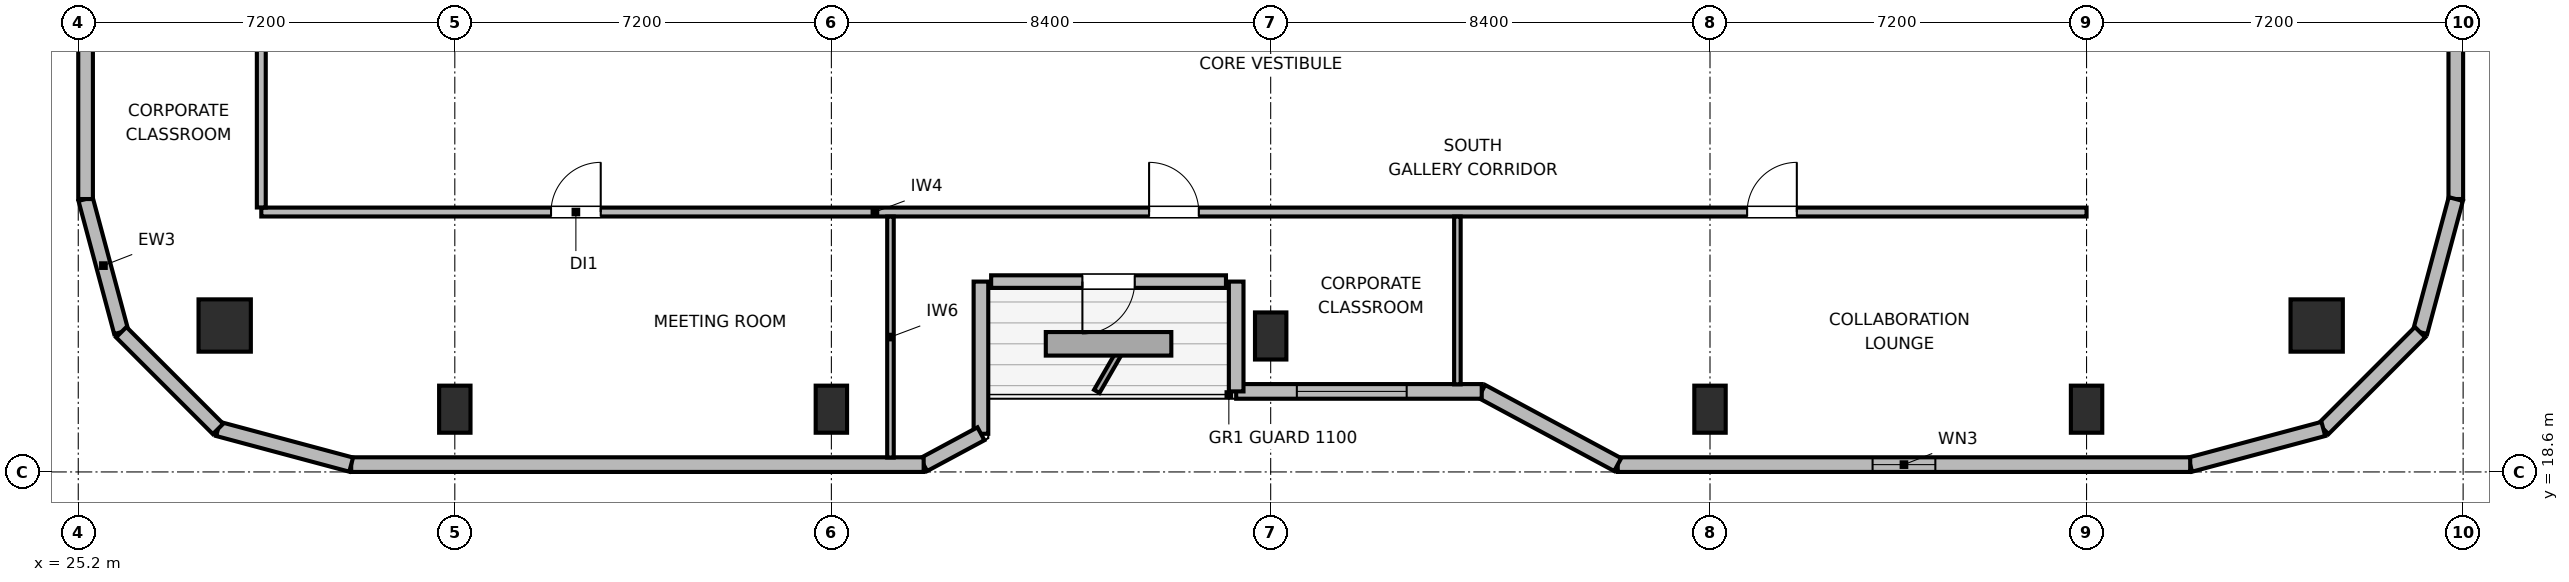
"""IFC4 building model, lengths in metres.
Left out: names, types, materials, properties, quantities, classifications, styles, units other than length and angle.
Written with IfcOpenShell. Run it as: python <this file> out.ifc"""

import sys

from ifc_helpers import new_model, si_unit, direction, frame, frame_2d, origin, origin_2d, place, context, subcontext, project, spatial, rectangle, circle, extrude, element, fill, save


model = new_model("IFC4")
c1 = context("Model", 3, precision=1e-05, world=origin(), true_north=direction((0.0, 1.0)))
c2 = subcontext(c1, "Body", "Model", "MODEL_VIEW")
j1 = project(units=[si_unit("LENGTHUNIT", "METRE"), si_unit("PLANEANGLEUNIT", "RADIAN")], contexts=[c1])
p1 = place(None, origin())
s1 = spatial("IfcSite", under=j1, at=p1, CompositionType="ELEMENT")
p2 = place(p1, origin())
s2 = spatial("IfcBuilding", under=s1, at=p2, CompositionType="ELEMENT")
p3 = place(p2, frame((0.0, 0.0, 219.3)))
s3 = spatial("IfcBuildingStorey", under=s2, at=p3, CompositionType="ELEMENT", Elevation=219.3)
for number, where, z_axis, x_axis in (
    (1, (28.0, 21.4, 0.0), (0.0, 0.0, 1.0), (1.0, 0.0, 0.0)),
    (2, (68.0, 21.4, 0.0), (0.0, 0.0, 1.0), (1.0, 0.0, 0.0)),
):
    element("IfcColumn", number, at=place(p3, frame(where, z_axis=z_axis, x_axis=x_axis)), inside=s3, PredefinedType="COLUMN", context=c2, shape_type="SweptSolid", body=[
        extrude(circle(Radius=0.5, at=origin_2d()), origin(), (0.0, 0.0, 1.0), 3.9),
    ])
for number, where, z_axis, x_axis in (
    (3, (32.4, 19.8, 0.0), (0.0, 0.0, 1.0), (1.0, 0.0, 0.0)),
    (4, (39.6, 19.8, 0.0), (0.0, 0.0, 1.0), (1.0, 0.0, 0.0)),
    (5, (48.0, 21.2, 0.0), (0.0, 0.0, 1.0), (1.0, 0.0, 0.0)),
    (6, (56.4, 19.8, 0.0), (0.0, 0.0, 1.0), (1.0, 0.0, 0.0)),
    (7, (63.6, 19.8, 0.0), (0.0, 0.0, 1.0), (1.0, 0.0, 0.0)),
):
    element("IfcColumn", number, at=place(p3, frame(where, z_axis=z_axis, x_axis=x_axis)), inside=s3, PredefinedType="COLUMN", context=c2, shape_type="SweptSolid", body=[
        extrude(rectangle(XDim=0.6, YDim=0.9, at=origin_2d()), origin(), (0.0, 0.0, 1.0), 3.9),
    ])
p4 = place(p3, frame((26.022, 21.272, 0.0), z_axis=(0.0, 0.0, 1.0), x_axis=(-0.2588904131, 0.965906700466, 0.0)))
e8 = element("IfcWall", 8, at=p4, inside=s3, PredefinedType="SOLIDWALL", context=c2, shape_type="SweptSolid", body=[
    extrude(rectangle(XDim=2.636, YDim=0.28, at=frame_2d((1.318, 0.0))), origin(), (0.0, 0.0, 1.0), 3.68),
])
p5 = place(p3, frame((25.34, 23.818, 0.0), z_axis=(0.0, 0.0, 1.0), x_axis=(0.0, 1.0, 0.0)))
e9 = element("IfcWall", 9, at=p5, inside=s3, PredefinedType="SOLIDWALL", context=c2, shape_type="SweptSolid", body=[
    extrude(rectangle(XDim=5.442, YDim=0.28, at=frame_2d((2.721, 0.0))), origin(), (0.0, 0.0, 1.0), 3.68),
])
p6 = place(p3, frame((70.66, 37.66, 0.0), z_axis=(0.0, 0.0, 1.0), x_axis=(0.0, -1.0, 0.0)))
e10 = element("IfcWall", 10, at=p6, inside=s3, PredefinedType="SOLIDWALL", context=c2, shape_type="SweptSolid", body=[
    extrude(rectangle(XDim=13.842, YDim=0.28, at=frame_2d((6.921, 0.0))), origin(), (0.0, 0.0, 1.0), 3.68),
])
p7 = place(p6, frame((8.346, 0.0, 0.85)))
e11 = element("IfcOpeningElement", 11, at=p7, cuts=e10, PredefinedType="OPENING", context=c2, shape_type="SweptSolid", body=[
    extrude(rectangle(XDim=2.1, YDim=1.05, at=frame_2d((1.05, 0.525))), frame((0.0, 0.15, 0.0), z_axis=(0.0, -1.0, 0.0), x_axis=(1.0, 0.0, 0.0)), (0.0, 0.0, 1.0), 0.3),
])
p8 = place(p3, frame((70.66, 23.818, 0.0), z_axis=(0.0, 0.0, 1.0), x_axis=(-0.2588904131, -0.965906700466, 0.0)))
e12 = element("IfcWall", 12, at=p8, inside=s3, PredefinedType="SOLIDWALL", context=c2, shape_type="SweptSolid", body=[
    extrude(rectangle(XDim=2.636, YDim=0.28, at=frame_2d((1.318, 0.0))), origin(), (0.0, 0.0, 1.0), 3.68),
])
p9 = place(p3, frame((69.978, 21.272, 0.0), z_axis=(0.0, 0.0, 1.0), x_axis=(-0.707153437963, -0.707060121331, 0.0)))
e13 = element("IfcWall", 13, at=p9, inside=s3, PredefinedType="SOLIDWALL", context=c2, shape_type="SweptSolid", body=[
    extrude(rectangle(XDim=2.616, YDim=0.28, at=frame_2d((1.308, 0.0))), origin(), (0.0, 0.0, 1.0), 3.68),
])
p10 = place(p3, frame((68.127, 19.423, 0.0), z_axis=(0.0, 0.0, 1.0), x_axis=(-0.965883534663, -0.258976828051, 0.0)))
e14 = element("IfcWall", 14, at=p10, inside=s3, PredefinedType="SOLIDWALL", context=c2, shape_type="SweptSolid", body=[
    extrude(rectangle(XDim=2.636, YDim=0.28, at=frame_2d((1.318, 0.0))), origin(), (0.0, 0.0, 1.0), 3.68),
])
p11 = place(p3, frame((65.582, 18.74, 0.0), z_axis=(0.0, 0.0, 1.0), x_axis=(-1.0, 0.0, 0.0)))
e15 = element("IfcWall", 15, at=p11, inside=s3, PredefinedType="SOLIDWALL", context=c2, shape_type="SweptSolid", body=[
    extrude(rectangle(XDim=10.946, YDim=0.28, at=frame_2d((5.473, 0.0))), origin(), (0.0, 0.0, 1.0), 3.68),
])
p12 = place(p11, frame((4.873, 0.0, 0.85)))
e16 = element("IfcOpeningElement", 16, at=p12, cuts=e15, PredefinedType="OPENING", context=c2, shape_type="SweptSolid", body=[
    extrude(rectangle(XDim=1.2, YDim=1.1, at=frame_2d((0.6, 0.55))), frame((0.0, 0.15, 0.0), z_axis=(0.0, -1.0, 0.0), x_axis=(1.0, 0.0, 0.0)), (0.0, 0.0, 1.0), 0.3),
])
p13 = place(p3, frame((54.635, 18.74, 0.0), z_axis=(0.0, 0.0, 1.0), x_axis=(-0.880473754814, 0.474094892488, 0.0)))
e17 = element("IfcWall", 17, at=p13, inside=s3, PredefinedType="SOLIDWALL", context=c2, shape_type="SweptSolid", body=[
    extrude(rectangle(XDim=2.953, YDim=0.28, at=frame_2d((1.477, 0.0))), origin(), (0.0, 0.0, 1.0), 2.265),
])
p14 = place(p3, frame((52.035, 20.14, 0.0), z_axis=(0.0, 0.0, 1.0), x_axis=(-1.0, 0.0, 0.0)))
e18 = element("IfcWall", 18, at=p14, inside=s3, PredefinedType="SOLIDWALL", context=c2, shape_type="SweptSolid", body=[
    extrude(rectangle(XDim=4.695, YDim=0.28, at=frame_2d((2.348, 0.0))), origin(), (0.0, 0.0, 1.0), 2.265),
])
p15 = place(p14, frame((1.435, 0.0, 0.85)))
e19 = element("IfcOpeningElement", 19, at=p15, cuts=e18, PredefinedType="OPENING", context=c2, shape_type="SweptSolid", body=[
    extrude(rectangle(XDim=2.1, YDim=1.05, at=frame_2d((1.05, 0.525))), frame((0.0, 0.15, 0.0), z_axis=(0.0, -1.0, 0.0), x_axis=(1.0, 0.0, 0.0)), (0.0, 0.0, 1.0), 0.3),
])
p16 = place(p3, frame((47.34, 20.14, 0.0), z_axis=(0.0, 0.0, 1.0), x_axis=(0.0, 1.0, 0.0)))
e20 = element("IfcWall", 20, at=p16, inside=s3, PredefinedType="SOLIDWALL", context=c2, shape_type="SweptSolid", body=[
    extrude(rectangle(XDim=2.1, YDim=0.28, at=frame_2d((1.05, 0.0))), origin(), (0.0, 0.0, 1.0), 2.265),
])
p17 = place(p3, frame((47.145, 22.24, 0.0), z_axis=(0.0, 0.0, 1.0), x_axis=(-1.0, 0.0, 0.0)))
e21 = element("IfcWall", 21, at=p17, inside=s3, PredefinedType="SOLIDWALL", context=c2, shape_type="SweptSolid", body=[
    extrude(rectangle(XDim=4.49, YDim=0.24, at=frame_2d((2.245, 0.0))), origin(), (0.0, 0.0, 1.0), 3.68),
])
p18 = place(p17, frame((1.745, 0.0, 0.0)))
e22 = element("IfcOpeningElement", 22, at=p18, cuts=e21, PredefinedType="OPENING", context=c2, shape_type="SweptSolid", body=[
    extrude(rectangle(XDim=1.0, YDim=2.02, at=frame_2d((0.5, 1.01))), frame((0.0, 0.13, 0.0), z_axis=(0.0, -1.0, 0.0), x_axis=(1.0, 0.0, 0.0)), (0.0, 0.0, 1.0), 0.26),
])
p19 = place(p3, frame((42.46, 22.24, 0.0), z_axis=(0.0, 0.0, 1.0), x_axis=(0.0, -1.0, 0.0)))
e23 = element("IfcWall", 23, at=p19, inside=s3, PredefinedType="SOLIDWALL", context=c2, shape_type="SweptSolid", body=[
    extrude(rectangle(XDim=2.91, YDim=0.28, at=frame_2d((1.455, 0.0))), origin(), (0.0, 0.0, 1.0), 2.265),
])
p20 = place(p3, frame((42.46, 19.33, 0.0), z_axis=(0.0, 0.0, 1.0), x_axis=(-0.880515214249, -0.474017887296, 0.0)))
e24 = element("IfcWall", 24, at=p20, inside=s3, PredefinedType="SOLIDWALL", context=c2, shape_type="SweptSolid", body=[
    extrude(rectangle(XDim=1.244, YDim=0.28, at=frame_2d((0.622, 0.0))), origin(), (0.0, 0.0, 1.0), 3.68),
])
p21 = place(p3, frame((41.365, 18.74, 0.0), z_axis=(0.0, 0.0, 1.0), x_axis=(-1.0, 0.0, 0.0)))
e25 = element("IfcWall", 25, at=p21, inside=s3, PredefinedType="SOLIDWALL", context=c2, shape_type="SweptSolid", body=[
    extrude(rectangle(XDim=10.946, YDim=0.28, at=frame_2d((5.473, 0.0))), origin(), (0.0, 0.0, 1.0), 3.68),
])
p22 = place(p3, frame((30.418, 18.74, 0.0), z_axis=(0.0, 0.0, 1.0), x_axis=(-0.965883534663, 0.258976828051, 0.0)))
e26 = element("IfcWall", 26, at=p22, inside=s3, PredefinedType="SOLIDWALL", context=c2, shape_type="SweptSolid", body=[
    extrude(rectangle(XDim=2.636, YDim=0.28, at=frame_2d((1.318, 0.0))), origin(), (0.0, 0.0, 1.0), 3.68),
])
p23 = place(p3, frame((27.873, 19.423, 0.0), z_axis=(0.0, 0.0, 1.0), x_axis=(-0.707153437963, 0.707060121331, 0.0)))
e27 = element("IfcWall", 27, at=p23, inside=s3, PredefinedType="SOLIDWALL", context=c2, shape_type="SweptSolid", body=[
    extrude(rectangle(XDim=2.616, YDim=0.28, at=frame_2d((1.308, 0.0))), origin(), (0.0, 0.0, 1.0), 3.68),
])
p24 = place(p3, frame((28.7, 23.57, 0.0), z_axis=(0.0, 0.0, 1.0), x_axis=(1.0, 0.0, 0.0)))
e28 = element("IfcWall", 28, at=p24, inside=s3, PredefinedType="PARTITIONING", context=c2, shape_type="SweptSolid", body=[
    extrude(rectangle(XDim=34.9, YDim=0.17, at=frame_2d((17.45, 0.0))), origin(), (0.0, 0.0, 1.0), 3.68),
])
p25 = place(p24, frame((5.54, 0.0, 0.0)))
e29 = element("IfcOpeningElement", 29, at=p25, cuts=e28, PredefinedType="OPENING", context=c2, shape_type="SweptSolid", body=[
    extrude(rectangle(XDim=0.95, YDim=2.04, at=frame_2d((0.475, 1.02))), frame((0.0, 0.095, 0.0), z_axis=(0.0, -1.0, 0.0), x_axis=(1.0, 0.0, 0.0)), (0.0, 0.0, 1.0), 0.19),
])
p26 = place(p24, frame((16.975, 0.0, 0.0)))
e30 = element("IfcOpeningElement", 30, at=p26, cuts=e28, PredefinedType="OPENING", context=c2, shape_type="SweptSolid", body=[
    extrude(rectangle(XDim=0.95, YDim=2.04, at=frame_2d((0.475, 1.02))), frame((0.0, 0.095, 0.0), z_axis=(0.0, -1.0, 0.0), x_axis=(1.0, 0.0, 0.0)), (0.0, 0.0, 1.0), 0.19),
])
p27 = place(p24, frame((28.41, 0.0, 0.0)))
e31 = element("IfcOpeningElement", 31, at=p27, cuts=e28, PredefinedType="OPENING", context=c2, shape_type="SweptSolid", body=[
    extrude(rectangle(XDim=0.95, YDim=2.04, at=frame_2d((0.475, 1.02))), frame((0.0, 0.095, 0.0), z_axis=(0.0, -1.0, 0.0), x_axis=(1.0, 0.0, 0.0)), (0.0, 0.0, 1.0), 0.19),
])
p28 = place(p3, frame((28.7, 23.657, 0.0), z_axis=(0.0, 0.0, 1.0), x_axis=(0.0, 1.0, 0.0)))
e32 = element("IfcWall", 32, at=p28, inside=s3, PredefinedType="PARTITIONING", context=c2, shape_type="SweptSolid", body=[
    extrude(rectangle(XDim=24.686, YDim=0.17, at=frame_2d((12.343, 0.0))), origin(), (0.0, 0.0, 1.0), 3.68),
])
p29 = place(p28, frame((4.353, 0.0, 0.0)))
e33 = element("IfcOpeningElement", 33, at=p29, cuts=e32, PredefinedType="OPENING", context=c2, shape_type="SweptSolid", body=[
    extrude(rectangle(XDim=0.95, YDim=2.04, at=frame_2d((0.475, 1.02))), frame((0.0, 0.095, 0.0), z_axis=(0.0, -1.0, 0.0), x_axis=(1.0, 0.0, 0.0)), (0.0, 0.0, 1.0), 0.19),
])
p30 = place(p28, frame((12.468, 0.0, 0.0)))
e34 = element("IfcOpeningElement", 34, at=p30, cuts=e32, PredefinedType="OPENING", context=c2, shape_type="SweptSolid", body=[
    extrude(rectangle(XDim=0.95, YDim=2.04, at=frame_2d((0.475, 1.02))), frame((0.0, 0.095, 0.0), z_axis=(0.0, -1.0, 0.0), x_axis=(1.0, 0.0, 0.0)), (0.0, 0.0, 1.0), 0.19),
])
p31 = place(p28, frame((19.983, 0.0, 0.0)))
e35 = element("IfcOpeningElement", 35, at=p31, cuts=e32, PredefinedType="OPENING", context=c2, shape_type="SweptSolid", body=[
    extrude(rectangle(XDim=0.95, YDim=2.04, at=frame_2d((0.475, 1.02))), frame((0.0, 0.095, 0.0), z_axis=(0.0, -1.0, 0.0), x_axis=(1.0, 0.0, 0.0)), (0.0, 0.0, 1.0), 0.19),
])
p32 = place(p3, frame((40.73, 18.875, 0.0), z_axis=(0.0, 0.0, 1.0), x_axis=(0.0, 1.0, 0.0)))
e36 = element("IfcWall", 36, at=p32, inside=s3, PredefinedType="PARTITIONING", context=c2, shape_type="SweptSolid", body=[
    extrude(rectangle(XDim=4.608, YDim=0.125, at=frame_2d((2.304, 0.0))), origin(), (0.0, 0.0, 1.0), 3.043),
])
p33 = place(p3, frame((51.57, 20.275, 0.0), z_axis=(0.0, 0.0, 1.0), x_axis=(0.0, 1.0, 0.0)))
e37 = element("IfcWall", 37, at=p33, inside=s3, PredefinedType="PARTITIONING", context=c2, shape_type="SweptSolid", body=[
    extrude(rectangle(XDim=3.208, YDim=0.125, at=frame_2d((1.604, 0.0))), origin(), (0.0, 0.0, 1.0), 3.68),
])
p34 = place(p12, origin())
e38 = element("IfcWindow", 38, at=p34, inside=s3, PartitioningType="SINGLE_PANEL", PredefinedType="WINDOW", context=c2, shape_type="SweptSolid", body=[
    extrude(rectangle(XDim=1.2, YDim=1.1, at=frame_2d((0.6, 0.55))), frame((0.0, 0.03, 0.0), z_axis=(0.0, -1.0, 0.0), x_axis=(1.0, 0.0, 0.0)), (0.0, 0.0, 1.0), 0.06),
])
fill(e16, e38)
p35 = place(p15, origin())
e39 = element("IfcWindow", 39, at=p35, inside=s3, PartitioningType="SINGLE_PANEL", PredefinedType="WINDOW", context=c2, shape_type="SweptSolid", body=[
    extrude(rectangle(XDim=2.1, YDim=1.05, at=frame_2d((1.05, 0.525))), frame((0.0, 0.03, 0.0), z_axis=(0.0, -1.0, 0.0), x_axis=(1.0, 0.0, 0.0)), (0.0, 0.0, 1.0), 0.06),
])
fill(e19, e39)
p36 = place(p18, origin())
e40 = element("IfcDoor", 40, at=p36, inside=s3, OperationType="SINGLE_SWING_RIGHT", PredefinedType="DOOR", context=c2, shape_type="SweptSolid", body=[
    extrude(rectangle(XDim=1.0, YDim=2.02, at=frame_2d((0.5, 1.01))), frame((0.0, 0.025, 0.0), z_axis=(0.0, -1.0, 0.0), x_axis=(1.0, 0.0, 0.0)), (0.0, 0.0, 1.0), 0.05),
])
fill(e22, e40)
p37 = place(p25, origin())
e41 = element("IfcDoor", 41, at=p37, inside=s3, OperationType="SINGLE_SWING_RIGHT", PredefinedType="DOOR", context=c2, shape_type="SweptSolid", body=[
    extrude(rectangle(XDim=0.95, YDim=2.04, at=frame_2d((0.475, 1.02))), frame((0.0, 0.025, 0.0), z_axis=(0.0, -1.0, 0.0), x_axis=(1.0, 0.0, 0.0)), (0.0, 0.0, 1.0), 0.05),
])
fill(e29, e41)
p38 = place(p26, origin())
e42 = element("IfcDoor", 42, at=p38, inside=s3, OperationType="SINGLE_SWING_LEFT", PredefinedType="DOOR", context=c2, shape_type="SweptSolid", body=[
    extrude(rectangle(XDim=0.95, YDim=2.04, at=frame_2d((0.475, 1.02))), frame((0.0, 0.025, 0.0), z_axis=(0.0, -1.0, 0.0), x_axis=(1.0, 0.0, 0.0)), (0.0, 0.0, 1.0), 0.05),
])
fill(e30, e42)
p39 = place(p27, origin())
e43 = element("IfcDoor", 43, at=p39, inside=s3, OperationType="SINGLE_SWING_RIGHT", PredefinedType="DOOR", context=c2, shape_type="SweptSolid", body=[
    extrude(rectangle(XDim=0.95, YDim=2.04, at=frame_2d((0.475, 1.02))), frame((0.0, 0.025, 0.0), z_axis=(0.0, -1.0, 0.0), x_axis=(1.0, 0.0, 0.0)), (0.0, 0.0, 1.0), 0.05),
])
fill(e31, e43)
save(model, sys.argv[1])
